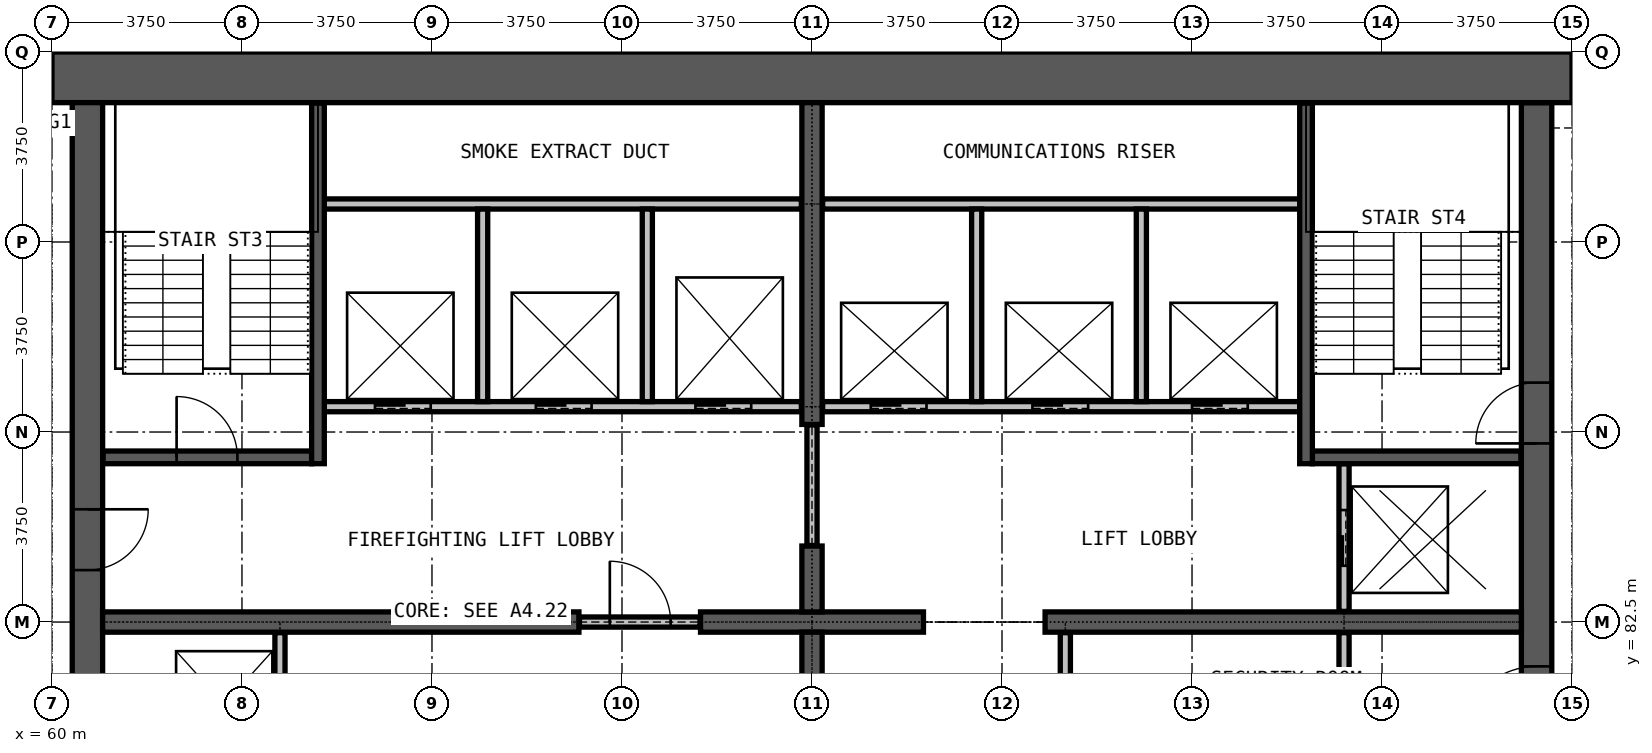
"""IFC4 building model, lengths in metres.
Left out: names, types, materials, properties, quantities, classifications, styles, units other than length and angle.
Written with IfcOpenShell. Run it as: python <this file> out.ifc"""

import sys

from ifc_helpers import new_model, si_unit, direction, frame, frame_2d, origin, place, context, subcontext, project, spatial, rectangle, extrude, element, fill, save


model = new_model("IFC4")
c1 = context("Model", 3, precision=1e-05, world=origin(), true_north=direction((0.0, 1.0)))
c2 = subcontext(c1, "Body", "Model", "MODEL_VIEW")
j1 = project(units=[si_unit("LENGTHUNIT", "METRE"), si_unit("PLANEANGLEUNIT", "RADIAN")], contexts=[c1])
p1 = place(None, origin())
s1 = spatial("IfcSite", under=j1, at=p1, CompositionType="ELEMENT")
p2 = place(p1, origin())
s2 = spatial("IfcBuilding", under=s1, at=p2, CompositionType="ELEMENT")
p3 = place(p2, frame((0.0, 0.0, 210.3)))
s3 = spatial("IfcBuildingStorey", under=s2, at=p3, CompositionType="ELEMENT", Elevation=210.3)
p4 = place(p3, frame((89.3, 72.25, 0.0), z_axis=(0.0, 0.0, 1.0), x_axis=(0.0, 1.0, 0.0)))
e1 = element("IfcWall", 1, at=p4, inside=s3, PredefinedType="SHEAR", context=c2, shape_type="SweptSolid", body=[
    extrude(rectangle(XDim=20.5, YDim=0.6, at=frame_2d((10.25, 0.0))), origin(), (0.0, 0.0, 1.0), 3.6),
])
p5 = place(p4, frame((0.275, 0.0, 0.0)))
e2 = element("IfcOpeningElement", 2, at=p5, cuts=e1, PredefinedType="OPENING", context=c2, shape_type="SweptSolid", body=[
    extrude(rectangle(XDim=1.2, YDim=2.2, at=frame_2d((0.6, 1.1))), frame((0.0, 0.31, 0.0), z_axis=(0.0, -1.0, 0.0), x_axis=(1.0, 0.0, 0.0)), (0.0, 0.0, 1.0), 0.62),
])
p6 = place(p4, frame((13.775, 0.0, 0.0)))
e3 = element("IfcOpeningElement", 3, at=p6, cuts=e1, PredefinedType="OPENING", context=c2, shape_type="SweptSolid", body=[
    extrude(rectangle(XDim=1.2, YDim=2.2, at=frame_2d((0.6, 1.1))), frame((0.0, 0.31, 0.0), z_axis=(0.0, -1.0, 0.0), x_axis=(1.0, 0.0, 0.0)), (0.0, 0.0, 1.0), 0.62),
])
p7 = place(p4, frame((7.875, 0.0, 0.0)))
e4 = element("IfcOpeningElement", 4, at=p7, cuts=e1, PredefinedType="OPENING", context=c2, shape_type="SweptSolid", body=[
    extrude(rectangle(XDim=1.5, YDim=2.2, at=frame_2d((0.75, 1.1))), frame((0.0, 0.31, 0.0), z_axis=(0.0, -1.0, 0.0), x_axis=(1.0, 0.0, 0.0)), (0.0, 0.0, 1.0), 0.62),
])
p8 = place(p3, frame((90.0, 93.25, 0.0), z_axis=(0.0, 0.0, 1.0), x_axis=(-1.0, 0.0, 0.0)))
e5 = element("IfcWall", 5, at=p8, inside=s3, PredefinedType="SHEAR", context=c2, shape_type="SweptSolid", body=[
    extrude(rectangle(XDim=30.0, YDim=1.0, at=frame_2d((15.0, 0.0))), origin(), (0.0, 0.0, 1.0), 3.6),
])
p9 = place(p3, frame((60.7, 92.75, 0.0), z_axis=(0.0, 0.0, 1.0), x_axis=(0.0, -1.0, 0.0)))
e6 = element("IfcWall", 6, at=p9, inside=s3, PredefinedType="SHEAR", context=c2, shape_type="SweptSolid", body=[
    extrude(rectangle(XDim=20.5, YDim=0.6, at=frame_2d((10.25, 0.0))), origin(), (0.0, 0.0, 1.0), 3.6),
])
p10 = place(p9, frame((19.025, 0.0, 0.0)))
e7 = element("IfcOpeningElement", 7, at=p10, cuts=e6, PredefinedType="OPENING", context=c2, shape_type="SweptSolid", body=[
    extrude(rectangle(XDim=1.2, YDim=2.2, at=frame_2d((0.6, 1.1))), frame((0.0, 0.31, 0.0), z_axis=(0.0, -1.0, 0.0), x_axis=(1.0, 0.0, 0.0)), (0.0, 0.0, 1.0), 0.62),
])
p11 = place(p9, frame((8.025, 0.0, 0.0)))
e8 = element("IfcOpeningElement", 8, at=p11, cuts=e6, PredefinedType="OPENING", context=c2, shape_type="SweptSolid", body=[
    extrude(rectangle(XDim=1.2, YDim=2.2, at=frame_2d((0.6, 1.1))), frame((0.0, 0.31, 0.0), z_axis=(0.0, -1.0, 0.0), x_axis=(1.0, 0.0, 0.0)), (0.0, 0.0, 1.0), 0.62),
])
p12 = place(p3, frame((61.0, 82.5, 0.0), z_axis=(0.0, 0.0, 1.0), x_axis=(1.0, 0.0, 0.0)))
e9 = element("IfcWall", 9, at=p12, inside=s3, PredefinedType="SHEAR", context=c2, shape_type="SweptSolid", body=[
    extrude(rectangle(XDim=9.4, YDim=0.4, at=frame_2d((4.7, 0.0))), origin(), (0.0, 0.0, 1.0), 3.6),
])
p13 = place(p3, frame((72.8, 82.5, 0.0), z_axis=(0.0, 0.0, 1.0), x_axis=(1.0, 0.0, 0.0)))
e10 = element("IfcWall", 10, at=p13, inside=s3, PredefinedType="SHEAR", context=c2, shape_type="SweptSolid", body=[
    extrude(rectangle(XDim=4.4, YDim=0.4, at=frame_2d((2.2, 0.0))), origin(), (0.0, 0.0, 1.0), 3.6),
])
p14 = place(p3, frame((79.6, 82.5, 0.0), z_axis=(0.0, 0.0, 1.0), x_axis=(1.0, 0.0, 0.0)))
e11 = element("IfcWall", 11, at=p14, inside=s3, PredefinedType="SHEAR", context=c2, shape_type="SweptSolid", body=[
    extrude(rectangle(XDim=9.4, YDim=0.4, at=frame_2d((4.7, 0.0))), origin(), (0.0, 0.0, 1.0), 3.6),
])
for number, where, z_axis, x_axis in (
    (12, (75.0, 81.0, 0.0), (0.0, 0.0, 1.0), (0.0, 1.0, 0.0)),
    (13, (75.0, 82.7, 0.0), (0.0, 0.0, 1.0), (0.0, 1.0, 0.0)),
):
    element("IfcWall", number, at=place(p3, frame(where, z_axis=z_axis, x_axis=x_axis)), inside=s3, PredefinedType="SHEAR", context=c2, shape_type="SweptSolid", body=[
        extrude(rectangle(XDim=1.3, YDim=0.4, at=frame_2d((0.65, 0.0))), origin(), (0.0, 0.0, 1.0), 3.6),
    ])
p15 = place(p3, frame((75.0, 86.4, 0.0), z_axis=(0.0, 0.0, 1.0), x_axis=(0.0, 1.0, 0.0)))
e14 = element("IfcWall", 14, at=p15, inside=s3, PredefinedType="SHEAR", context=c2, shape_type="SweptSolid", body=[
    extrude(rectangle(XDim=6.35, YDim=0.4, at=frame_2d((3.175, 0.0))), origin(), (0.0, 0.0, 1.0), 3.6),
])
p16 = place(p3, frame((70.41, 82.5, 0.0), z_axis=(0.0, 0.0, 1.0), x_axis=(1.0, 0.0, 0.0)))
e15 = element("IfcWall", 15, at=p16, inside=s3, PredefinedType="PARTITIONING", context=c2, shape_type="SweptSolid", body=[
    extrude(rectangle(XDim=2.38, YDim=0.2, at=frame_2d((1.19, 0.0))), origin(), (0.0, 0.0, 1.0), 2.4),
])
p17 = place(p16, frame((0.6, 0.0, 0.0)))
e16 = element("IfcOpeningElement", 16, at=p17, cuts=e15, PredefinedType="OPENING", context=c2, shape_type="SweptSolid", body=[
    extrude(rectangle(XDim=1.2, YDim=2.2, at=frame_2d((0.6, 1.1))), frame((0.0, 0.11, 0.0), z_axis=(0.0, -1.0, 0.0), x_axis=(1.0, 0.0, 0.0)), (0.0, 0.0, 1.0), 0.22),
])
p18 = place(p3, frame((75.0, 84.01, 0.0), z_axis=(0.0, 0.0, 1.0), x_axis=(0.0, 1.0, 0.0)))
e17 = element("IfcWall", 17, at=p18, inside=s3, PredefinedType="PARTITIONING", context=c2, shape_type="SweptSolid", body=[
    extrude(rectangle(XDim=2.38, YDim=0.2, at=frame_2d((1.19, 0.0))), origin(), (0.0, 0.0, 1.0), 2.4),
])
for number, where, z_axis, x_axis in (
    (18, (80.0, 79.4, 0.0), (0.0, 0.0, 1.0), (0.0, 1.0, 0.0)),
    (19, (85.5, 79.4, 0.0), (0.0, 0.0, 1.0), (0.0, 1.0, 0.0)),
):
    element("IfcWall", number, at=place(p3, frame(where, z_axis=z_axis, x_axis=x_axis)), inside=s3, PredefinedType="PARTITIONING", context=c2, shape_type="SweptSolid", body=[
        extrude(rectangle(XDim=2.89, YDim=0.2, at=frame_2d((1.445, 0.0))), origin(), (0.0, 0.0, 1.0), 3.3),
    ])
p19 = place(p3, frame((65.375, 86.75, 0.0), z_axis=(0.0, 0.0, 1.0), x_axis=(1.0, 0.0, 0.0)))
e20 = element("IfcWall", 20, at=p19, inside=s3, PredefinedType="PARTITIONING", context=c2, shape_type="SweptSolid", body=[
    extrude(rectangle(XDim=9.415, YDim=0.2, at=frame_2d((4.708, 0.0))), origin(), (0.0, 0.0, 1.0), 3.3),
])
p20 = place(p19, frame((1.0, 0.0, 0.0)))
e21 = element("IfcOpeningElement", 21, at=p20, cuts=e20, PredefinedType="OPENING", context=c2, shape_type="SweptSolid", body=[
    extrude(rectangle(XDim=1.1, YDim=2.2, at=frame_2d((0.55, 1.1))), frame((0.0, 0.11, 0.0), z_axis=(0.0, -1.0, 0.0), x_axis=(1.0, 0.0, 0.0)), (0.0, 0.0, 1.0), 0.22),
])
p21 = place(p19, frame((4.175, 0.0, 0.0)))
e22 = element("IfcOpeningElement", 22, at=p21, cuts=e20, PredefinedType="OPENING", context=c2, shape_type="SweptSolid", body=[
    extrude(rectangle(XDim=1.1, YDim=2.2, at=frame_2d((0.55, 1.1))), frame((0.0, 0.11, 0.0), z_axis=(0.0, -1.0, 0.0), x_axis=(1.0, 0.0, 0.0)), (0.0, 0.0, 1.0), 0.22),
])
p22 = place(p19, frame((7.325, 0.0, 0.0)))
e23 = element("IfcOpeningElement", 23, at=p22, cuts=e20, PredefinedType="OPENING", context=c2, shape_type="SweptSolid", body=[
    extrude(rectangle(XDim=1.1, YDim=2.2, at=frame_2d((0.55, 1.1))), frame((0.0, 0.11, 0.0), z_axis=(0.0, -1.0, 0.0), x_axis=(1.0, 0.0, 0.0)), (0.0, 0.0, 1.0), 0.22),
])
p23 = place(p3, frame((75.21, 86.75, 0.0), z_axis=(0.0, 0.0, 1.0), x_axis=(1.0, 0.0, 0.0)))
e24 = element("IfcWall", 24, at=p23, inside=s3, PredefinedType="PARTITIONING", context=c2, shape_type="SweptSolid", body=[
    extrude(rectangle(XDim=9.415, YDim=0.2, at=frame_2d((4.708, 0.0))), origin(), (0.0, 0.0, 1.0), 3.3),
])
p24 = place(p23, frame((0.95, 0.0, 0.0)))
e25 = element("IfcOpeningElement", 25, at=p24, cuts=e24, PredefinedType="OPENING", context=c2, shape_type="SweptSolid", body=[
    extrude(rectangle(XDim=1.1, YDim=2.2, at=frame_2d((0.55, 1.1))), frame((0.0, 0.11, 0.0), z_axis=(0.0, -1.0, 0.0), x_axis=(1.0, 0.0, 0.0)), (0.0, 0.0, 1.0), 0.22),
])
p25 = place(p23, frame((4.14, 0.0, 0.0)))
e26 = element("IfcOpeningElement", 26, at=p25, cuts=e24, PredefinedType="OPENING", context=c2, shape_type="SweptSolid", body=[
    extrude(rectangle(XDim=1.1, YDim=2.2, at=frame_2d((0.55, 1.1))), frame((0.0, 0.11, 0.0), z_axis=(0.0, -1.0, 0.0), x_axis=(1.0, 0.0, 0.0)), (0.0, 0.0, 1.0), 0.22),
])
p26 = place(p23, frame((7.29, 0.0, 0.0)))
e27 = element("IfcOpeningElement", 27, at=p26, cuts=e24, PredefinedType="OPENING", context=c2, shape_type="SweptSolid", body=[
    extrude(rectangle(XDim=1.1, YDim=2.2, at=frame_2d((0.55, 1.1))), frame((0.0, 0.11, 0.0), z_axis=(0.0, -1.0, 0.0), x_axis=(1.0, 0.0, 0.0)), (0.0, 0.0, 1.0), 0.22),
])
for number, where, z_axis, x_axis in (
    (28, (65.375, 90.75, 0.0), (0.0, 0.0, 1.0), (1.0, 0.0, 0.0)),
    (29, (75.21, 90.75, 0.0), (0.0, 0.0, 1.0), (1.0, 0.0, 0.0)),
):
    element("IfcWall", number, at=place(p3, frame(where, z_axis=z_axis, x_axis=x_axis)), inside=s3, PredefinedType="PARTITIONING", context=c2, shape_type="SweptSolid", body=[
        extrude(rectangle(XDim=9.415, YDim=0.2, at=frame_2d((4.708, 0.0))), origin(), (0.0, 0.0, 1.0), 3.3),
    ])
p27 = place(p3, frame((64.5, 79.375, 0.0), z_axis=(0.0, 0.0, 1.0), x_axis=(0.0, 1.0, 0.0)))
e30 = element("IfcWall", 30, at=p27, inside=s3, PredefinedType="PARTITIONING", context=c2, shape_type="SweptSolid", body=[
    extrude(rectangle(XDim=2.915, YDim=0.2, at=frame_2d((1.458, 0.0))), origin(), (0.0, 0.0, 1.0), 3.3),
])
for number, where, z_axis, x_axis in (
    (31, (68.5, 86.85, 0.0), (0.0, 0.0, 1.0), (0.0, 1.0, 0.0)),
    (32, (71.75, 86.85, 0.0), (0.0, 0.0, 1.0), (0.0, 1.0, 0.0)),
    (33, (78.25, 86.85, 0.0), (0.0, 0.0, 1.0), (0.0, 1.0, 0.0)),
    (34, (81.5, 86.85, 0.0), (0.0, 0.0, 1.0), (0.0, 1.0, 0.0)),
):
    element("IfcWall", number, at=place(p3, frame(where, z_axis=z_axis, x_axis=x_axis)), inside=s3, PredefinedType="PARTITIONING", context=c2, shape_type="SweptSolid", body=[
        extrude(rectangle(XDim=3.8, YDim=0.2, at=frame_2d((1.9, 0.0))), origin(), (0.0, 0.0, 1.0), 3.3),
    ])
p28 = place(p3, frame((85.5, 82.71, 0.0), z_axis=(0.0, 0.0, 1.0), x_axis=(0.0, 1.0, 0.0)))
e35 = element("IfcWall", 35, at=p28, inside=s3, PredefinedType="PARTITIONING", context=c2, shape_type="SweptSolid", body=[
    extrude(rectangle(XDim=2.915, YDim=0.2, at=frame_2d((1.458, 0.0))), origin(), (0.0, 0.0, 1.0), 3.3),
])
p29 = place(p28, frame((0.9, 0.0, 0.0)))
e36 = element("IfcOpeningElement", 36, at=p29, cuts=e35, PredefinedType="OPENING", context=c2, shape_type="SweptSolid", body=[
    extrude(rectangle(XDim=1.1, YDim=2.2, at=frame_2d((0.55, 1.1))), frame((0.0, 0.11, 0.0), z_axis=(0.0, -1.0, 0.0), x_axis=(1.0, 0.0, 0.0)), (0.0, 0.0, 1.0), 0.22),
])
p30 = place(p3, frame((61.01, 85.75, 0.0), z_axis=(0.0, 0.0, 1.0), x_axis=(1.0, 0.0, 0.0)))
e37 = element("IfcWall", 37, at=p30, inside=s3, PredefinedType="PARTITIONING", context=c2, shape_type="SweptSolid", body=[
    extrude(rectangle(XDim=4.115, YDim=0.25, at=frame_2d((2.058, 0.0))), origin(), (0.0, 0.0, 1.0), 3.3),
])
p31 = place(p30, frame((1.45, 0.0, 0.0)))
e38 = element("IfcOpeningElement", 38, at=p31, cuts=e37, PredefinedType="OPENING", context=c2, shape_type="SweptSolid", body=[
    extrude(rectangle(XDim=1.2, YDim=2.2, at=frame_2d((0.6, 1.1))), frame((0.0, 0.135, 0.0), z_axis=(0.0, -1.0, 0.0), x_axis=(1.0, 0.0, 0.0)), (0.0, 0.0, 1.0), 0.27),
])
p32 = place(p3, frame((84.875, 85.75, 0.0), z_axis=(0.0, 0.0, 1.0), x_axis=(1.0, 0.0, 0.0)))
e39 = element("IfcWall", 39, at=p32, inside=s3, PredefinedType="PARTITIONING", context=c2, shape_type="SweptSolid", body=[
    extrude(rectangle(XDim=4.115, YDim=0.25, at=frame_2d((2.058, 0.0))), origin(), (0.0, 0.0, 1.0), 3.3),
])
for number, where, z_axis, x_axis in (
    (40, (65.25, 85.625, 0.0), (0.0, 0.0, 1.0), (0.0, 1.0, 0.0)),
    (41, (84.75, 85.625, 0.0), (0.0, 0.0, 1.0), (0.0, 1.0, 0.0)),
):
    element("IfcWall", number, at=place(p3, frame(where, z_axis=z_axis, x_axis=x_axis)), inside=s3, PredefinedType="PARTITIONING", context=c2, shape_type="SweptSolid", body=[
        extrude(rectangle(XDim=7.115, YDim=0.25, at=frame_2d((3.558, 0.0))), origin(), (0.0, 0.0, 1.0), 3.3),
    ])
p33 = place(p24, origin())
e42 = element("IfcDoor", 42, at=p33, inside=s3, OperationType="DOUBLE_DOOR_SLIDING", PredefinedType="DOOR", context=c2, shape_type="SweptSolid", body=[
    extrude(rectangle(XDim=1.1, YDim=2.2, at=frame_2d((0.55, 1.1))), frame((0.0, 0.025, 0.0), z_axis=(0.0, -1.0, 0.0), x_axis=(1.0, 0.0, 0.0)), (0.0, 0.0, 1.0), 0.05),
])
fill(e25, e42)
p34 = place(p25, origin())
e43 = element("IfcDoor", 43, at=p34, inside=s3, OperationType="DOUBLE_DOOR_SLIDING", PredefinedType="DOOR", context=c2, shape_type="SweptSolid", body=[
    extrude(rectangle(XDim=1.1, YDim=2.2, at=frame_2d((0.55, 1.1))), frame((0.0, 0.025, 0.0), z_axis=(0.0, -1.0, 0.0), x_axis=(1.0, 0.0, 0.0)), (0.0, 0.0, 1.0), 0.05),
])
fill(e26, e43)
p35 = place(p26, origin())
e44 = element("IfcDoor", 44, at=p35, inside=s3, OperationType="DOUBLE_DOOR_SLIDING", PredefinedType="DOOR", context=c2, shape_type="SweptSolid", body=[
    extrude(rectangle(XDim=1.1, YDim=2.2, at=frame_2d((0.55, 1.1))), frame((0.0, 0.025, 0.0), z_axis=(0.0, -1.0, 0.0), x_axis=(1.0, 0.0, 0.0)), (0.0, 0.0, 1.0), 0.05),
])
fill(e27, e44)
p36 = place(p20, origin())
e45 = element("IfcDoor", 45, at=p36, inside=s3, OperationType="DOUBLE_DOOR_SLIDING", PredefinedType="DOOR", context=c2, shape_type="SweptSolid", body=[
    extrude(rectangle(XDim=1.1, YDim=2.2, at=frame_2d((0.55, 1.1))), frame((0.0, 0.025, 0.0), z_axis=(0.0, -1.0, 0.0), x_axis=(1.0, 0.0, 0.0)), (0.0, 0.0, 1.0), 0.05),
])
fill(e21, e45)
p37 = place(p21, origin())
e46 = element("IfcDoor", 46, at=p37, inside=s3, OperationType="DOUBLE_DOOR_SLIDING", PredefinedType="DOOR", context=c2, shape_type="SweptSolid", body=[
    extrude(rectangle(XDim=1.1, YDim=2.2, at=frame_2d((0.55, 1.1))), frame((0.0, 0.025, 0.0), z_axis=(0.0, -1.0, 0.0), x_axis=(1.0, 0.0, 0.0)), (0.0, 0.0, 1.0), 0.05),
])
fill(e22, e46)
p38 = place(p22, origin())
e47 = element("IfcDoor", 47, at=p38, inside=s3, OperationType="DOUBLE_DOOR_SLIDING", PredefinedType="DOOR", context=c2, shape_type="SweptSolid", body=[
    extrude(rectangle(XDim=1.1, YDim=2.2, at=frame_2d((0.55, 1.1))), frame((0.0, 0.025, 0.0), z_axis=(0.0, -1.0, 0.0), x_axis=(1.0, 0.0, 0.0)), (0.0, 0.0, 1.0), 0.05),
])
fill(e23, e47)
p39 = place(p29, origin())
e48 = element("IfcDoor", 48, at=p39, inside=s3, OperationType="DOUBLE_DOOR_SLIDING", PredefinedType="DOOR", context=c2, shape_type="SweptSolid", body=[
    extrude(rectangle(XDim=1.1, YDim=2.2, at=frame_2d((0.55, 1.1))), frame((0.0, 0.025, 0.0), z_axis=(0.0, -1.0, 0.0), x_axis=(1.0, 0.0, 0.0)), (0.0, 0.0, 1.0), 0.05),
])
fill(e36, e48)
p40 = place(p17, origin())
e49 = element("IfcDoor", 49, at=p40, inside=s3, OperationType="SINGLE_SWING_LEFT", PredefinedType="DOOR", context=c2, shape_type="SweptSolid", body=[
    extrude(rectangle(XDim=1.2, YDim=2.2, at=frame_2d((0.6, 1.1))), frame((0.0, 0.025, 0.0), z_axis=(0.0, -1.0, 0.0), x_axis=(1.0, 0.0, 0.0)), (0.0, 0.0, 1.0), 0.05),
])
fill(e16, e49)
p41 = place(p31, origin())
e50 = element("IfcDoor", 50, at=p41, inside=s3, OperationType="SINGLE_SWING_RIGHT", PredefinedType="DOOR", context=c2, shape_type="SweptSolid", body=[
    extrude(rectangle(XDim=1.2, YDim=2.2, at=frame_2d((0.6, 1.1))), frame((0.0, 0.025, 0.0), z_axis=(0.0, -1.0, 0.0), x_axis=(1.0, 0.0, 0.0)), (0.0, 0.0, 1.0), 0.05),
])
fill(e38, e50)
p42 = place(p6, origin())
e51 = element("IfcDoor", 51, at=p42, inside=s3, OperationType="SINGLE_SWING_RIGHT", PredefinedType="DOOR", context=c2, shape_type="SweptSolid", body=[
    extrude(rectangle(XDim=1.2, YDim=2.2, at=frame_2d((0.6, 1.1))), frame((0.0, 0.025, 0.0), z_axis=(0.0, -1.0, 0.0), x_axis=(1.0, 0.0, 0.0)), (0.0, 0.0, 1.0), 0.05),
])
fill(e3, e51)
p43 = place(p7, origin())
e52 = element("IfcDoor", 52, at=p43, inside=s3, OperationType="DOUBLE_DOOR_SINGLE_SWING", PredefinedType="DOOR", context=c2, shape_type="SweptSolid", body=[
    extrude(rectangle(XDim=1.5, YDim=2.2, at=frame_2d((0.75, 1.1))), frame((0.0, 0.025, 0.0), z_axis=(0.0, -1.0, 0.0), x_axis=(1.0, 0.0, 0.0)), (0.0, 0.0, 1.0), 0.05),
])
fill(e4, e52)
p44 = place(p11, origin())
e53 = element("IfcDoor", 53, at=p44, inside=s3, OperationType="SINGLE_SWING_LEFT", PredefinedType="DOOR", context=c2, shape_type="SweptSolid", body=[
    extrude(rectangle(XDim=1.2, YDim=2.2, at=frame_2d((0.6, 1.1))), frame((0.0, 0.025, 0.0), z_axis=(0.0, -1.0, 0.0), x_axis=(1.0, 0.0, 0.0)), (0.0, 0.0, 1.0), 0.05),
])
fill(e8, e53)
save(model, sys.argv[1])
